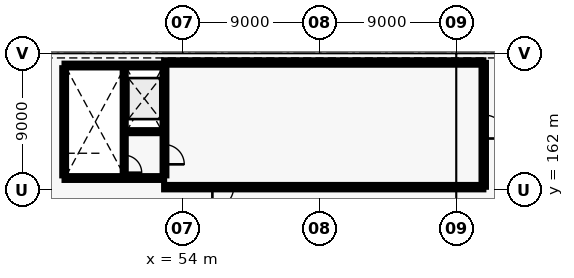
"""IFC4 building model, lengths in metres.
Left out: names, types, materials, properties, quantities, classifications, styles, units other than length and angle.
Written with IfcOpenShell. Run it as: python <this file> out.ifc"""

import sys

from ifc_helpers import new_model, si_unit, direction, frame, frame_2d, origin, place, context, subcontext, project, spatial, rectangle, extrude, element, fill, save


model = new_model("IFC4")
c1 = context("Model", 3, precision=1e-05, world=origin(), true_north=direction((0.0, 1.0)))
c2 = subcontext(c1, "Body", "Model", "MODEL_VIEW")
j1 = project(units=[si_unit("LENGTHUNIT", "METRE"), si_unit("PLANEANGLEUNIT", "RADIAN")], contexts=[c1])
p1 = place(None, origin())
s1 = spatial("IfcSite", under=j1, at=p1, CompositionType="ELEMENT")
p2 = place(p1, origin())
s2 = spatial("IfcBuilding", under=s1, at=p2, CompositionType="ELEMENT")
p3 = place(p2, frame((0.0, 0.0, 13.5)))
s3 = spatial("IfcBuildingStorey", under=s2, at=p3, CompositionType="ELEMENT", Elevation=13.5)
p4 = place(p3, frame((52.75, 162.2, 0.0), z_axis=(0.0, 0.0, 1.0), x_axis=(1.0, 0.0, 0.0)))
e1 = element("IfcWall", 1, at=p4, inside=s3, PredefinedType="SOLIDWALL", context=c2, shape_type="SweptSolid", body=[
    extrude(rectangle(XDim=21.05, YDim=0.34, at=frame_2d((10.525, 0.0))), origin(), (0.0, 0.0, 1.0), 3.5),
])
p5 = place(p4, frame((3.2, 0.0, 0.0)))
e2 = element("IfcOpeningElement", 2, at=p5, cuts=e1, PredefinedType="OPENING", context=c2, shape_type="SweptSolid", body=[
    extrude(rectangle(XDim=1.4, YDim=2.2, at=frame_2d((0.7, 1.1))), frame((0.0, 0.18, 0.0), z_axis=(0.0, -1.0, 0.0), x_axis=(1.0, 0.0, 0.0)), (0.0, 0.0, 1.0), 0.36),
])
p6 = place(p3, frame((52.75, 170.4, 0.0), z_axis=(0.0, 0.0, 1.0), x_axis=(1.0, 0.0, 0.0)))
e3 = element("IfcWall", 3, at=p6, inside=s3, PredefinedType="SOLIDWALL", context=c2, shape_type="SweptSolid", body=[
    extrude(rectangle(XDim=21.05, YDim=0.34, at=frame_2d((10.525, 0.0))), origin(), (0.0, 0.0, 1.0), 3.5),
])
p7 = place(p3, frame((73.8, 162.2, 0.0), z_axis=(0.0, 0.0, 1.0), x_axis=(0.0, 1.0, 0.0)))
e4 = element("IfcWall", 4, at=p7, inside=s3, PredefinedType="SOLIDWALL", context=c2, shape_type="SweptSolid", body=[
    extrude(rectangle(XDim=8.2, YDim=0.34, at=frame_2d((4.1, 0.0))), origin(), (0.0, 0.0, 1.0), 3.5),
])
p8 = place(p7, frame((3.2, 0.0, 0.0)))
e5 = element("IfcOpeningElement", 5, at=p8, cuts=e4, PredefinedType="OPENING", context=c2, shape_type="SweptSolid", body=[
    extrude(rectangle(XDim=1.55, YDim=2.2, at=frame_2d((0.775, 1.1))), frame((0.0, 0.18, 0.0), z_axis=(0.0, -1.0, 0.0), x_axis=(1.0, 0.0, 0.0)), (0.0, 0.0, 1.0), 0.36),
])
for number, where, z_axis, x_axis in (
    (6, (46.2, 162.8, 0.0), (0.0, 0.0, 1.0), (1.0, 0.0, 0.0)),
    (7, (46.2, 170.2, 0.0), (0.0, 0.0, 1.0), (1.0, 0.0, 0.0)),
):
    element("IfcWall", number, at=place(p3, frame(where, z_axis=z_axis, x_axis=x_axis)), inside=s3, PredefinedType="SHEAR", context=c2, shape_type="SweptSolid", body=[
        extrude(rectangle(XDim=6.6, YDim=0.3, at=frame_2d((3.3, 0.0))), origin(), (0.0, 0.0, 1.0), 3.7),
    ])
p9 = place(p3, frame((46.2, 162.95, 0.0), z_axis=(0.0, 0.0, 1.0), x_axis=(0.0, 1.0, 0.0)))
e8 = element("IfcWall", 8, at=p9, inside=s3, PredefinedType="SHEAR", context=c2, shape_type="SweptSolid", body=[
    extrude(rectangle(XDim=7.1, YDim=0.3, at=frame_2d((3.55, 0.0))), origin(), (0.0, 0.0, 1.0), 3.7),
])
p10 = place(p3, frame((52.8, 162.95, 0.0), z_axis=(0.0, 0.0, 1.0), x_axis=(0.0, 1.0, 0.0)))
e9 = element("IfcWall", 9, at=p10, inside=s3, PredefinedType="SHEAR", context=c2, shape_type="SweptSolid", body=[
    extrude(rectangle(XDim=7.1, YDim=0.3, at=frame_2d((3.55, 0.0))), origin(), (0.0, 0.0, 1.0), 3.7),
])
p11 = place(p10, frame((0.75, 0.0, 0.0)))
e10 = element("IfcOpeningElement", 10, at=p11, cuts=e9, PredefinedType="OPENING", context=c2, shape_type="SweptSolid", body=[
    extrude(rectangle(XDim=1.3, YDim=2.15, at=frame_2d((0.65, 1.075))), frame((0.0, 0.16, 0.0), z_axis=(0.0, -1.0, 0.0), x_axis=(1.0, 0.0, 0.0)), (0.0, 0.0, 1.0), 0.32),
])
p12 = place(p3, frame((50.15, 162.95, 0.0), z_axis=(0.0, 0.0, 1.0), x_axis=(0.0, 1.0, 0.0)))
e11 = element("IfcWall", 11, at=p12, inside=s3, PredefinedType="SHEAR", context=c2, shape_type="SweptSolid", body=[
    extrude(rectangle(XDim=7.1, YDim=0.25, at=frame_2d((3.55, 0.0))), origin(), (0.0, 0.0, 1.0), 3.7),
])
p13 = place(p12, frame((0.2, 0.0, 0.0)))
e12 = element("IfcOpeningElement", 12, at=p13, cuts=e11, PredefinedType="OPENING", context=c2, shape_type="SweptSolid", body=[
    extrude(rectangle(XDim=1.15, YDim=2.15, at=frame_2d((0.575, 1.075))), frame((0.0, 0.135, 0.0), z_axis=(0.0, -1.0, 0.0), x_axis=(1.0, 0.0, 0.0)), (0.0, 0.0, 1.0), 0.27),
])
p14 = place(p3, frame((50.27, 165.85, 0.0), z_axis=(0.0, 0.0, 1.0), x_axis=(1.0, 0.0, 0.0)))
e13 = element("IfcWall", 13, at=p14, inside=s3, PredefinedType="SHEAR", context=c2, shape_type="SweptSolid", body=[
    extrude(rectangle(XDim=2.38, YDim=0.25, at=frame_2d((1.19, 0.0))), origin(), (0.0, 0.0, 1.0), 3.7),
])
p15 = place(p14, frame((0.39, 0.0, 0.0)))
e14 = element("IfcOpeningElement", 14, at=p15, cuts=e13, PredefinedType="OPENING", context=c2, shape_type="SweptSolid", body=[
    extrude(rectangle(XDim=1.6, YDim=2.3, at=frame_2d((0.8, 1.15))), frame((0.0, 0.135, 0.0), z_axis=(0.0, -1.0, 0.0), x_axis=(1.0, 0.0, 0.0)), (0.0, 0.0, 1.0), 0.27),
])
p16 = place(p5, frame((1.4, 0.0, 0.0), z_axis=(0.0, 0.0, 1.0), x_axis=(-1.0, 0.0, 0.0)))
e15 = element("IfcDoor", 15, at=p16, inside=s3, OperationType="DOUBLE_DOOR_SINGLE_SWING", PredefinedType="DOOR", context=c2, shape_type="SweptSolid", body=[
    extrude(rectangle(XDim=1.4, YDim=2.2, at=frame_2d((0.7, 1.1))), frame((0.0, 0.025, 0.0), z_axis=(0.0, -1.0, 0.0), x_axis=(1.0, 0.0, 0.0)), (0.0, 0.0, 1.0), 0.05),
])
fill(e2, e15)
p17 = place(p8, frame((1.55, 0.0, 0.0), z_axis=(0.0, 0.0, 1.0), x_axis=(-1.0, 0.0, 0.0)))
e16 = element("IfcDoor", 16, at=p17, inside=s3, OperationType="DOUBLE_DOOR_SINGLE_SWING", PredefinedType="DOOR", context=c2, shape_type="SweptSolid", body=[
    extrude(rectangle(XDim=1.55, YDim=2.2, at=frame_2d((0.775, 1.1))), frame((0.0, 0.025, 0.0), z_axis=(0.0, -1.0, 0.0), x_axis=(1.0, 0.0, 0.0)), (0.0, 0.0, 1.0), 0.05),
])
fill(e5, e16)
p18 = place(p11, frame((1.3, 0.0, 0.0), z_axis=(0.0, 0.0, 1.0), x_axis=(-1.0, 0.0, 0.0)))
e17 = element("IfcDoor", 17, at=p18, inside=s3, OperationType="DOUBLE_DOOR_SINGLE_SWING", PredefinedType="DOOR", context=c2, shape_type="SweptSolid", body=[
    extrude(rectangle(XDim=1.3, YDim=2.15, at=frame_2d((0.65, 1.075))), frame((0.0, 0.025, 0.0), z_axis=(0.0, -1.0, 0.0), x_axis=(1.0, 0.0, 0.0)), (0.0, 0.0, 1.0), 0.05),
])
fill(e10, e17)
p19 = place(p13, frame((1.15, 0.0, 0.0), z_axis=(0.0, 0.0, 1.0), x_axis=(-1.0, 0.0, 0.0)))
e18 = element("IfcDoor", 18, at=p19, inside=s3, OperationType="SINGLE_SWING_LEFT", PredefinedType="DOOR", context=c2, shape_type="SweptSolid", body=[
    extrude(rectangle(XDim=1.15, YDim=2.15, at=frame_2d((0.575, 1.075))), frame((0.0, 0.025, 0.0), z_axis=(0.0, -1.0, 0.0), x_axis=(1.0, 0.0, 0.0)), (0.0, 0.0, 1.0), 0.05),
])
fill(e12, e18)
p20 = place(p15, origin())
e19 = element("IfcDoor", 19, at=p20, inside=s3, OperationType="SLIDING_TO_LEFT", PredefinedType="DOOR", context=c2, shape_type="SweptSolid", body=[
    extrude(rectangle(XDim=1.6, YDim=2.3, at=frame_2d((0.8, 1.15))), frame((0.0, 0.025, 0.0), z_axis=(0.0, -1.0, 0.0), x_axis=(1.0, 0.0, 0.0)), (0.0, 0.0, 1.0), 0.05),
])
fill(e14, e19)
save(model, sys.argv[1])
